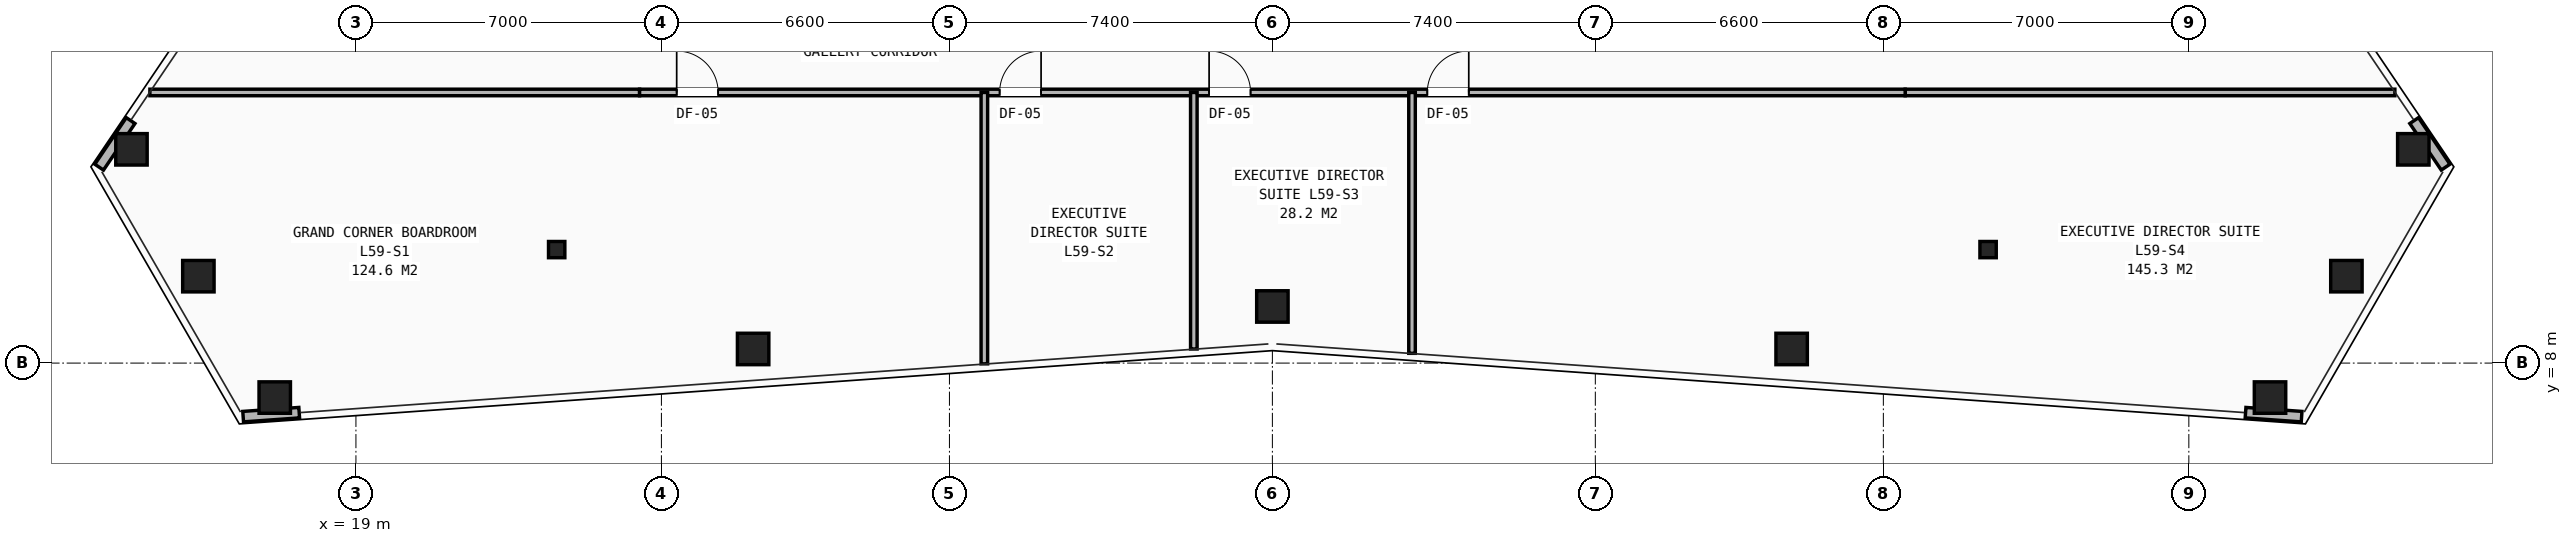
"""IFC4 building model, lengths in metres.
Left out: names, types, materials, properties, quantities, classifications, styles, units other than length and angle.
Written with IfcOpenShell. Run it as: python <this file> out.ifc"""

import sys

from ifc_helpers import new_model, si_unit, direction, frame, frame_2d, origin, origin_2d, place, context, subcontext, project, spatial, rectangle, hollow_rectangle, i_section, extrude, element, fill, save


model = new_model("IFC4")
c1 = context("Model", 3, precision=1e-05, world=origin(), true_north=direction((0.0, 1.0)))
c2 = subcontext(c1, "Body", "Model", "MODEL_VIEW")
j1 = project(units=[si_unit("LENGTHUNIT", "METRE"), si_unit("PLANEANGLEUNIT", "RADIAN")], contexts=[c1])
p1 = place(None, origin())
s1 = spatial("IfcSite", under=j1, at=p1, CompositionType="ELEMENT")
p2 = place(p1, origin())
s2 = spatial("IfcBuilding", under=s1, at=p2, CompositionType="ELEMENT")
p3 = place(p2, frame((0.0, 0.0, 208.4)))
s3 = spatial("IfcBuildingStorey", under=s2, at=p3, CompositionType="ELEMENT", Elevation=208.4)
for number, where, z_axis, x_axis in (
    (1, (23.6, 10.6, 0.0), (0.0, 0.0, 1.0), (1.0, 0.0, 0.0)),
    (2, (56.4, 10.6, 0.0), (0.0, 0.0, 1.0), (1.0, 0.0, 0.0)),
):
    element("IfcColumn", number, at=place(p3, frame(where, z_axis=z_axis, x_axis=x_axis)), inside=s3, PredefinedType="COLUMN", context=c2, shape_type="SweptSolid", body=[
        extrude(i_section(OverallWidth=0.374, OverallDepth=0.372, WebThickness=0.016, FlangeThickness=0.026, at=origin_2d()), origin(), (0.0, 0.0, 1.0), 3.5),
    ])
for number, where, z_axis, x_axis in (
    (3, (13.856, 12.897, 0.0), (0.0, 0.0, 1.0), (1.0, 0.0, 0.0)),
    (4, (15.389, 9.991, 0.0), (0.0, 0.0, 1.0), (1.0, 0.0, 0.0)),
    (5, (17.14, 7.21, 0.0), (0.0, 0.0, 1.0), (1.0, 0.0, 0.0)),
    (6, (28.102, 8.323, 0.0), (0.0, 0.0, 1.0), (1.0, 0.0, 0.0)),
    (7, (40.0, 9.297, 0.0), (0.0, 0.0, 1.0), (1.0, 0.0, 0.0)),
    (8, (51.898, 8.323, 0.0), (0.0, 0.0, 1.0), (1.0, 0.0, 0.0)),
    (9, (62.86, 7.21, 0.0), (0.0, 0.0, 1.0), (1.0, 0.0, 0.0)),
    (10, (64.611, 9.991, 0.0), (0.0, 0.0, 1.0), (1.0, 0.0, 0.0)),
    (11, (66.144, 12.897, 0.0), (0.0, 0.0, 1.0), (1.0, 0.0, 0.0)),
):
    element("IfcColumn", number, at=place(p3, frame(where, z_axis=z_axis, x_axis=x_axis)), inside=s3, PredefinedType="COLUMN", context=c2, shape_type="SweptSolid", body=[
        extrude(hollow_rectangle(XDim=0.72, YDim=0.72, WallThickness=0.05, at=origin_2d()), origin(), (0.0, 0.0, 1.0), 3.5),
    ])
p4 = place(p3, frame((13.837, 13.556, 0.0), z_axis=(0.0, 0.0, 1.0), x_axis=(-0.559984079849, -0.828503367715, 0.0)))
e12 = element("IfcWall", 12, at=p4, inside=s3, PredefinedType="SHEAR", context=c2, shape_type="SweptSolid", body=[
    extrude(rectangle(XDim=1.287, YDim=0.24, at=frame_2d((0.644, 0.0))), origin(), (0.0, 0.0, 1.0), 2.623),
])
for number, where, z_axis, x_axis in (
    (13, (16.416, 6.773, 0.0), (0.0, 0.0, 1.0), (0.997, 0.071, 0.0)),
    (14, (62.3, 6.865, 0.0), (0.0, 0.0, 1.0), (0.997, -0.071, 0.0)),
):
    element("IfcWall", number, at=place(p3, frame(where, z_axis=z_axis, x_axis=x_axis)), inside=s3, PredefinedType="SHEAR", context=c2, shape_type="SweptSolid", body=[
        extrude(rectangle(XDim=1.288, YDim=0.24, at=frame_2d((0.644, 0.0))), origin(), (0.0, 0.0, 1.0), 2.623),
    ])
p5 = place(p3, frame((66.884, 12.489, 0.0), z_axis=(0.0, 0.0, 1.0), x_axis=(-0.559984079849, 0.828503367715, 0.0)))
e15 = element("IfcWall", 15, at=p5, inside=s3, PredefinedType="SHEAR", context=c2, shape_type="SweptSolid", body=[
    extrude(rectangle(XDim=1.287, YDim=0.24, at=frame_2d((0.644, 0.0))), origin(), (0.0, 0.0, 1.0), 2.623),
])
for number, where, z_axis, x_axis in (
    (16, (14.279, 14.2, 0.0), (0.0, 0.0, 1.0), (1.0, 0.0, 0.0)),
    (17, (54.5, 14.2, 0.0), (0.0, 0.0, 1.0), (1.0, 0.0, 0.0)),
):
    element("IfcWall", number, at=place(p3, frame(where, z_axis=z_axis, x_axis=x_axis)), inside=s3, PredefinedType="PARTITIONING", context=c2, shape_type="SweptSolid", body=[
        extrude(rectangle(XDim=11.221, YDim=0.15, at=frame_2d((5.611, 0.0))), origin(), (0.0, 0.0, 1.0), 2.292),
    ])
p6 = place(p3, frame((25.5, 14.2, 0.0), z_axis=(0.0, 0.0, 1.0), x_axis=(1.0, 0.0, 0.0)))
e18 = element("IfcWall", 18, at=p6, inside=s3, PredefinedType="PARTITIONING", context=c2, shape_type="SweptSolid", body=[
    extrude(rectangle(XDim=29.0, YDim=0.15, at=frame_2d((14.5, 0.0))), origin(), (0.0, 0.0, 1.0), 2.292),
])
p7 = place(p6, frame((0.85, 0.0, 0.0)))
e19 = element("IfcOpeningElement", 19, at=p7, cuts=e18, PredefinedType="OPENING", context=c2, shape_type="SweptSolid", body=[
    extrude(rectangle(XDim=0.95, YDim=2.1, at=frame_2d((0.475, 1.05))), frame((0.0, 0.085, 0.0), z_axis=(0.0, -1.0, 0.0), x_axis=(1.0, 0.0, 0.0)), (0.0, 0.0, 1.0), 0.17),
])
p8 = place(p6, frame((8.25, 0.0, 0.0)))
e20 = element("IfcOpeningElement", 20, at=p8, cuts=e18, PredefinedType="OPENING", context=c2, shape_type="SweptSolid", body=[
    extrude(rectangle(XDim=0.95, YDim=2.1, at=frame_2d((0.475, 1.05))), frame((0.0, 0.085, 0.0), z_axis=(0.0, -1.0, 0.0), x_axis=(1.0, 0.0, 0.0)), (0.0, 0.0, 1.0), 0.17),
])
p9 = place(p6, frame((13.05, 0.0, 0.0)))
e21 = element("IfcOpeningElement", 21, at=p9, cuts=e18, PredefinedType="OPENING", context=c2, shape_type="SweptSolid", body=[
    extrude(rectangle(XDim=0.95, YDim=2.1, at=frame_2d((0.475, 1.05))), frame((0.0, 0.085, 0.0), z_axis=(0.0, -1.0, 0.0), x_axis=(1.0, 0.0, 0.0)), (0.0, 0.0, 1.0), 0.17),
])
p10 = place(p6, frame((18.05, 0.0, 0.0)))
e22 = element("IfcOpeningElement", 22, at=p10, cuts=e18, PredefinedType="OPENING", context=c2, shape_type="SweptSolid", body=[
    extrude(rectangle(XDim=0.95, YDim=2.1, at=frame_2d((0.475, 1.05))), frame((0.0, 0.085, 0.0), z_axis=(0.0, -1.0, 0.0), x_axis=(1.0, 0.0, 0.0)), (0.0, 0.0, 1.0), 0.17),
])
p11 = place(p3, frame((33.4, 7.982, 0.0), z_axis=(0.0, 0.0, 1.0), x_axis=(0.0, 1.0, 0.0)))
e23 = element("IfcWall", 23, at=p11, inside=s3, PredefinedType="PARTITIONING", context=c2, shape_type="SweptSolid", body=[
    extrude(rectangle(XDim=6.218, YDim=0.15, at=frame_2d((3.109, 0.0))), origin(), (0.0, 0.0, 1.0), 2.628),
])
p12 = place(p3, frame((38.2, 8.323, 0.0), z_axis=(0.0, 0.0, 1.0), x_axis=(0.0, 1.0, 0.0)))
e24 = element("IfcWall", 24, at=p12, inside=s3, PredefinedType="PARTITIONING", context=c2, shape_type="SweptSolid", body=[
    extrude(rectangle(XDim=5.877, YDim=0.15, at=frame_2d((2.938, 0.0))), origin(), (0.0, 0.0, 1.0), 2.292),
])
p13 = place(p3, frame((43.2, 8.224, 0.0), z_axis=(0.0, 0.0, 1.0), x_axis=(0.0, 1.0, 0.0)))
e25 = element("IfcWall", 25, at=p13, inside=s3, PredefinedType="PARTITIONING", context=c2, shape_type="SweptSolid", body=[
    extrude(rectangle(XDim=5.976, YDim=0.15, at=frame_2d((2.988, 0.0))), origin(), (0.0, 0.0, 1.0), 2.628),
])
p14 = place(p7, origin())
e26 = element("IfcDoor", 26, at=p14, inside=s3, OperationType="SINGLE_SWING_LEFT", PredefinedType="DOOR", context=c2, shape_type="SweptSolid", body=[
    extrude(rectangle(XDim=0.95, YDim=2.1, at=frame_2d((0.475, 1.05))), frame((0.0, 0.025, 0.0), z_axis=(0.0, -1.0, 0.0), x_axis=(1.0, 0.0, 0.0)), (0.0, 0.0, 1.0), 0.05),
])
fill(e19, e26)
p15 = place(p8, origin())
e27 = element("IfcDoor", 27, at=p15, inside=s3, OperationType="SINGLE_SWING_RIGHT", PredefinedType="DOOR", context=c2, shape_type="SweptSolid", body=[
    extrude(rectangle(XDim=0.95, YDim=2.1, at=frame_2d((0.475, 1.05))), frame((0.0, 0.025, 0.0), z_axis=(0.0, -1.0, 0.0), x_axis=(1.0, 0.0, 0.0)), (0.0, 0.0, 1.0), 0.05),
])
fill(e20, e27)
p16 = place(p9, origin())
e28 = element("IfcDoor", 28, at=p16, inside=s3, OperationType="SINGLE_SWING_LEFT", PredefinedType="DOOR", context=c2, shape_type="SweptSolid", body=[
    extrude(rectangle(XDim=0.95, YDim=2.1, at=frame_2d((0.475, 1.05))), frame((0.0, 0.025, 0.0), z_axis=(0.0, -1.0, 0.0), x_axis=(1.0, 0.0, 0.0)), (0.0, 0.0, 1.0), 0.05),
])
fill(e21, e28)
p17 = place(p10, origin())
e29 = element("IfcDoor", 29, at=p17, inside=s3, OperationType="SINGLE_SWING_RIGHT", PredefinedType="DOOR", context=c2, shape_type="SweptSolid", body=[
    extrude(rectangle(XDim=0.95, YDim=2.1, at=frame_2d((0.475, 1.05))), frame((0.0, 0.025, 0.0), z_axis=(0.0, -1.0, 0.0), x_axis=(1.0, 0.0, 0.0)), (0.0, 0.0, 1.0), 0.05),
])
fill(e22, e29)
save(model, sys.argv[1])
